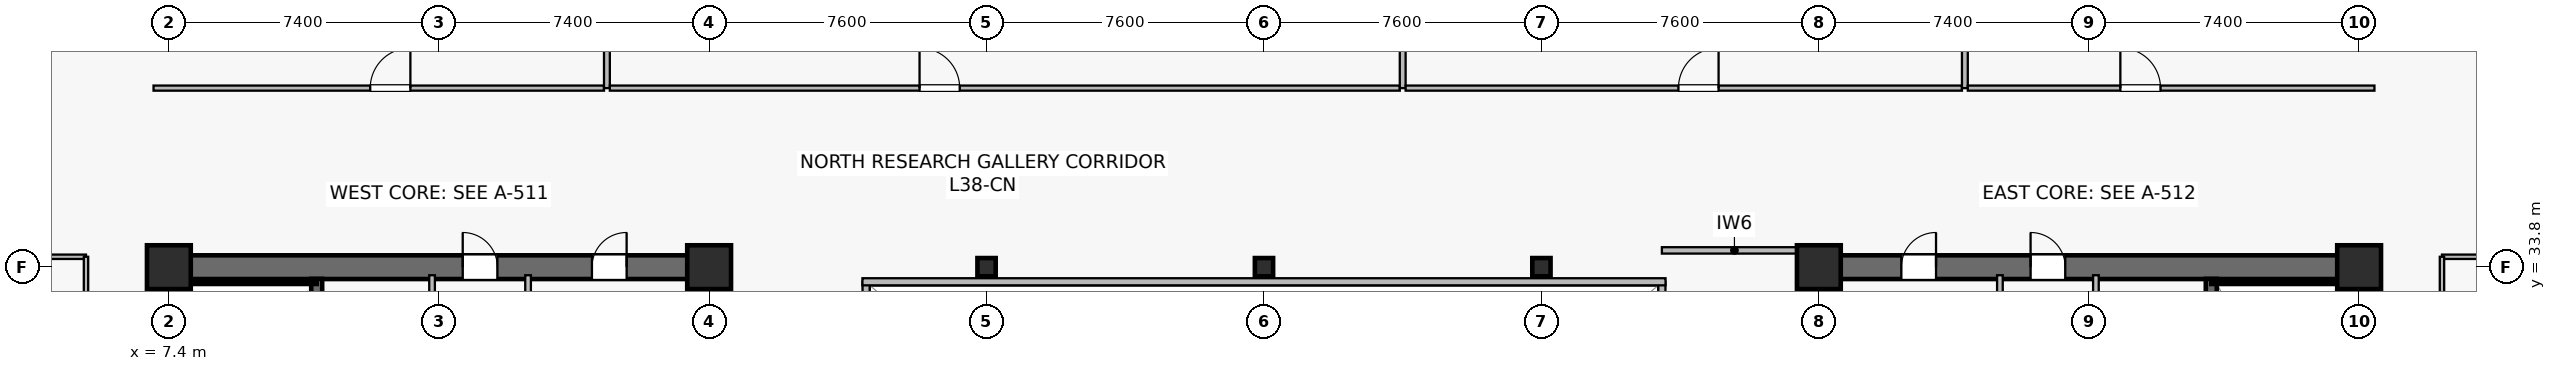
"""IFC4 building model, lengths in metres.
Left out: names, types, materials, properties, quantities, classifications, styles, units other than length and angle.
Written with IfcOpenShell. Run it as: python <this file> out.ifc"""

import sys

from ifc_helpers import new_model, si_unit, direction, frame, frame_2d, origin, origin_2d, place, context, subcontext, project, spatial, rectangle, hollow_rectangle, extrude, source, transform, mapped, element, fill, save


model = new_model("IFC4")
c1 = context("Model", 3, precision=1e-05, world=origin(), true_north=direction((0.0, 1.0)))
c2 = subcontext(c1, "Body", "Model", "MODEL_VIEW")
j1 = project(units=[si_unit("LENGTHUNIT", "METRE"), si_unit("PLANEANGLEUNIT", "RADIAN")], contexts=[c1])
p1 = place(None, origin())
s1 = spatial("IfcSite", under=j1, at=p1, CompositionType="ELEMENT")
p2 = place(p1, origin())
s2 = spatial("IfcBuilding", under=s1, at=p2, CompositionType="ELEMENT")
p3 = place(p2, frame((0.0, 0.0, 158.4)))
s3 = spatial("IfcBuildingStorey", under=s2, at=p3, CompositionType="ELEMENT", Elevation=158.4)
p4 = place(p3, frame((7.075, 33.8, 0.0), z_axis=(0.0, 0.0, 1.0), x_axis=(1.0, 0.0, 0.0)))
e1 = element("IfcWall", 1, at=p4, inside=s3, PredefinedType="SHEAR", context=c2, shape_type="SweptSolid", body=[
    extrude(rectangle(XDim=15.45, YDim=0.65, at=frame_2d((7.725, 0.0))), origin(), (0.0, 0.0, 1.0), 3.79),
])
p5 = place(p4, frame((8.375, 0.0, 0.0)))
e2 = element("IfcOpeningElement", 2, at=p5, cuts=e1, PredefinedType="OPENING", context=c2, shape_type="SweptSolid", body=[
    extrude(rectangle(XDim=0.95, YDim=2.15, at=frame_2d((0.475, 1.075))), frame((0.0, 0.335, 0.0), z_axis=(0.0, -1.0, 0.0), x_axis=(1.0, 0.0, 0.0)), (0.0, 0.0, 1.0), 0.67),
])
p6 = place(p4, frame((11.915, 0.0, 0.0)))
e3 = element("IfcOpeningElement", 3, at=p6, cuts=e1, PredefinedType="OPENING", context=c2, shape_type="SweptSolid", body=[
    extrude(rectangle(XDim=0.95, YDim=2.15, at=frame_2d((0.475, 1.075))), frame((0.0, 0.335, 0.0), z_axis=(0.0, -1.0, 0.0), x_axis=(1.0, 0.0, 0.0)), (0.0, 0.0, 1.0), 0.67),
])
p7 = place(p3, frame((7.4, 15.125, 0.0), z_axis=(0.0, 0.0, 1.0), x_axis=(0.0, 1.0, 0.0)))
e4 = element("IfcWall", 4, at=p7, inside=s3, PredefinedType="SHEAR", context=c2, shape_type="SweptSolid", body=[
    extrude(rectangle(XDim=18.35, YDim=0.65, at=frame_2d((9.175, 0.0))), origin(), (0.0, 0.0, 1.0), 3.79),
])
p8 = place(p3, frame((22.2, 15.125, 0.0), z_axis=(0.0, 0.0, 1.0), x_axis=(0.0, 1.0, 0.0)))
e5 = element("IfcWall", 5, at=p8, inside=s3, PredefinedType="SHEAR", context=c2, shape_type="SweptSolid", body=[
    extrude(rectangle(XDim=18.35, YDim=0.65, at=frame_2d((9.175, 0.0))), origin(), (0.0, 0.0, 1.0), 3.79),
])
p9 = place(p8, frame((3.425, 0.0, 0.0)))
e6 = element("IfcOpeningElement", 6, at=p9, cuts=e5, PredefinedType="OPENING", context=c2, shape_type="SweptSolid", body=[
    extrude(rectangle(XDim=1.42, YDim=2.2, at=frame_2d((0.71, 1.1))), frame((0.0, 0.335, 0.0), z_axis=(0.0, -1.0, 0.0), x_axis=(1.0, 0.0, 0.0)), (0.0, 0.0, 1.0), 0.67),
])
p10 = place(p3, frame((11.45, 24.85, 0.0), z_axis=(0.0, 0.0, 1.0), x_axis=(0.0, 1.0, 0.0)))
e7 = element("IfcWall", 7, at=p10, inside=s3, PredefinedType="SHEAR", context=c2, shape_type="SweptSolid", body=[
    extrude(rectangle(XDim=8.63, YDim=0.3, at=frame_2d((4.315, 0.0))), origin(), (0.0, 0.0, 1.0), 3.79),
])
p11 = place(p10, frame((0.42, 0.0, 0.0)))
e8 = element("IfcOpeningElement", 8, at=p11, cuts=e7, PredefinedType="OPENING", context=c2, shape_type="SweptSolid", body=[
    extrude(rectangle(XDim=1.1, YDim=2.15, at=frame_2d((0.55, 1.075))), frame((0.0, 0.16, 0.0), z_axis=(0.0, -1.0, 0.0), x_axis=(1.0, 0.0, 0.0)), (0.0, 0.0, 1.0), 0.32),
])
p12 = place(p3, frame((7.73, 33.4, 0.0), z_axis=(0.0, 0.0, 1.0), x_axis=(1.0, 0.0, 0.0)))
e9 = element("IfcWall", 9, at=p12, inside=s3, PredefinedType="SOLIDWALL", context=c2, shape_type="SweptSolid", body=[
    extrude(rectangle(XDim=3.72, YDim=0.12, at=frame_2d((1.86, 0.0))), origin(), (0.0, 0.0, 1.0), 3.79),
])
p13 = place(p3, frame((7.73, 25.0, 0.0), z_axis=(0.0, 0.0, 1.0), x_axis=(0.0, 1.0, 0.0)))
e10 = element("IfcWall", 10, at=p13, inside=s3, PredefinedType="SOLIDWALL", context=c2, shape_type="SweptSolid", body=[
    extrude(rectangle(XDim=8.32, YDim=0.12, at=frame_2d((4.16, 0.0))), origin(), (0.0, 0.0, 1.0), 3.79),
])
p14 = place(p3, frame((52.275, 33.8, 0.0), z_axis=(0.0, 0.0, 1.0), x_axis=(1.0, 0.0, 0.0)))
e11 = element("IfcWall", 11, at=p14, inside=s3, PredefinedType="SHEAR", context=c2, shape_type="SweptSolid", body=[
    extrude(rectangle(XDim=15.45, YDim=0.65, at=frame_2d((7.725, 0.0))), origin(), (0.0, 0.0, 1.0), 3.79),
])
p15 = place(p14, frame((6.125, 0.0, 0.0)))
e12 = element("IfcOpeningElement", 12, at=p15, cuts=e11, PredefinedType="OPENING", context=c2, shape_type="SweptSolid", body=[
    extrude(rectangle(XDim=0.95, YDim=2.15, at=frame_2d((0.475, 1.075))), frame((0.0, 0.335, 0.0), z_axis=(0.0, -1.0, 0.0), x_axis=(1.0, 0.0, 0.0)), (0.0, 0.0, 1.0), 0.67),
])
p16 = place(p14, frame((2.585, 0.0, 0.0)))
e13 = element("IfcOpeningElement", 13, at=p16, cuts=e11, PredefinedType="OPENING", context=c2, shape_type="SweptSolid", body=[
    extrude(rectangle(XDim=0.95, YDim=2.15, at=frame_2d((0.475, 1.075))), frame((0.0, 0.335, 0.0), z_axis=(0.0, -1.0, 0.0), x_axis=(1.0, 0.0, 0.0)), (0.0, 0.0, 1.0), 0.67),
])
p17 = place(p3, frame((52.6, 15.125, 0.0), z_axis=(0.0, 0.0, 1.0), x_axis=(0.0, 1.0, 0.0)))
e14 = element("IfcWall", 14, at=p17, inside=s3, PredefinedType="SHEAR", context=c2, shape_type="SweptSolid", body=[
    extrude(rectangle(XDim=18.35, YDim=0.65, at=frame_2d((9.175, 0.0))), origin(), (0.0, 0.0, 1.0), 3.79),
])
p18 = place(p17, frame((3.425, 0.0, 0.0)))
e15 = element("IfcOpeningElement", 15, at=p18, cuts=e14, PredefinedType="OPENING", context=c2, shape_type="SweptSolid", body=[
    extrude(rectangle(XDim=1.42, YDim=2.2, at=frame_2d((0.71, 1.1))), frame((0.0, 0.335, 0.0), z_axis=(0.0, -1.0, 0.0), x_axis=(1.0, 0.0, 0.0)), (0.0, 0.0, 1.0), 0.67),
])
p19 = place(p3, frame((67.4, 15.125, 0.0), z_axis=(0.0, 0.0, 1.0), x_axis=(0.0, 1.0, 0.0)))
e16 = element("IfcWall", 16, at=p19, inside=s3, PredefinedType="SHEAR", context=c2, shape_type="SweptSolid", body=[
    extrude(rectangle(XDim=18.35, YDim=0.65, at=frame_2d((9.175, 0.0))), origin(), (0.0, 0.0, 1.0), 3.79),
])
p20 = place(p3, frame((63.35, 24.85, 0.0), z_axis=(0.0, 0.0, 1.0), x_axis=(0.0, 1.0, 0.0)))
e17 = element("IfcWall", 17, at=p20, inside=s3, PredefinedType="SHEAR", context=c2, shape_type="SweptSolid", body=[
    extrude(rectangle(XDim=8.63, YDim=0.3, at=frame_2d((4.315, 0.0))), origin(), (0.0, 0.0, 1.0), 3.79),
])
p21 = place(p20, frame((0.42, 0.0, 0.0)))
e18 = element("IfcOpeningElement", 18, at=p21, cuts=e17, PredefinedType="OPENING", context=c2, shape_type="SweptSolid", body=[
    extrude(rectangle(XDim=1.1, YDim=2.15, at=frame_2d((0.55, 1.075))), frame((0.0, 0.16, 0.0), z_axis=(0.0, -1.0, 0.0), x_axis=(1.0, 0.0, 0.0)), (0.0, 0.0, 1.0), 0.32),
])
p22 = place(p3, frame((63.35, 33.4, 0.0), z_axis=(0.0, 0.0, 1.0), x_axis=(1.0, 0.0, 0.0)))
e19 = element("IfcWall", 19, at=p22, inside=s3, PredefinedType="SOLIDWALL", context=c2, shape_type="SweptSolid", body=[
    extrude(rectangle(XDim=3.72, YDim=0.12, at=frame_2d((1.86, 0.0))), origin(), (0.0, 0.0, 1.0), 3.79),
])
p23 = place(p3, frame((67.07, 25.0, 0.0), z_axis=(0.0, 0.0, 1.0), x_axis=(0.0, 1.0, 0.0)))
e20 = element("IfcWall", 20, at=p23, inside=s3, PredefinedType="SOLIDWALL", context=c2, shape_type="SweptSolid", body=[
    extrude(rectangle(XDim=8.32, YDim=0.12, at=frame_2d((4.16, 0.0))), origin(), (0.0, 0.0, 1.0), 3.79),
])
m1 = source(origin(), c2, "Body", "SweptSolid", [
    extrude(rectangle(XDim=1.2, YDim=1.2, at=origin_2d()), origin(), (0.0, 0.0, 1.0), 4.1),
])
for number, where, z_axis, x_axis in (
    (21, (7.4, 33.8, 0.0), (0.0, 0.0, 1.0), (1.0, 0.0, 0.0)),
    (22, (22.2, 33.8, 0.0), (0.0, 0.0, 1.0), (1.0, 0.0, 0.0)),
    (23, (52.6, 33.8, 0.0), (0.0, 0.0, 1.0), (1.0, 0.0, 0.0)),
    (24, (67.4, 33.8, 0.0), (0.0, 0.0, 1.0), (1.0, 0.0, 0.0)),
):
    element("IfcColumn", number, at=place(p3, frame(where, z_axis=z_axis, x_axis=x_axis)), inside=s3, PredefinedType="COLUMN", context=c2, shape_type="MappedRepresentation", body=[
        mapped(m1, transform((0.0, 0.0, 0.0), scale=1.0)),
    ])
m2 = source(origin(), c2, "Body", "SweptSolid", [
    extrude(hollow_rectangle(XDim=0.5, YDim=0.5, WallThickness=0.022, at=origin_2d()), origin(), (0.0, 0.0, 1.0), 4.1),
])
for number, where, z_axis, x_axis in (
    (25, (29.8, 33.8, 0.0), (0.0, 0.0, 1.0), (1.0, 0.0, 0.0)),
    (26, (37.4, 33.8, 0.0), (0.0, 0.0, 1.0), (1.0, 0.0, 0.0)),
    (27, (45.0, 33.8, 0.0), (0.0, 0.0, 1.0), (1.0, 0.0, 0.0)),
):
    element("IfcColumn", number, at=place(p3, frame(where, z_axis=z_axis, x_axis=x_axis)), inside=s3, PredefinedType="COLUMN", context=c2, shape_type="MappedRepresentation", body=[
        mapped(m2, transform((0.0, 0.0, 0.0), scale=1.0)),
    ])
p24 = place(p3, frame((14.61, 29.65, 0.0), z_axis=(0.0, 0.0, 1.0), x_axis=(0.0, 1.0, 0.0)))
e28 = element("IfcWall", 28, at=p24, inside=s3, PredefinedType="PLUMBINGWALL", context=c2, shape_type="SweptSolid", body=[
    extrude(rectangle(XDim=3.93, YDim=0.155, at=frame_2d((1.965, 0.0))), origin(), (0.0, 0.0, 1.0), 3.187),
])
p25 = place(p3, frame((17.24, 29.65, 0.0), z_axis=(0.0, 0.0, 1.0), x_axis=(0.0, 1.0, 0.0)))
e29 = element("IfcWall", 29, at=p25, inside=s3, PredefinedType="PLUMBINGWALL", context=c2, shape_type="SweptSolid", body=[
    extrude(rectangle(XDim=3.93, YDim=0.155, at=frame_2d((1.965, 0.0))), origin(), (0.0, 0.0, 1.0), 3.79),
])
p26 = place(p3, frame((60.19, 29.65, 0.0), z_axis=(0.0, 0.0, 1.0), x_axis=(0.0, 1.0, 0.0)))
e30 = element("IfcWall", 30, at=p26, inside=s3, PredefinedType="PLUMBINGWALL", context=c2, shape_type="SweptSolid", body=[
    extrude(rectangle(XDim=3.93, YDim=0.155, at=frame_2d((1.965, 0.0))), origin(), (0.0, 0.0, 1.0), 3.187),
])
p27 = place(p3, frame((57.56, 29.65, 0.0), z_axis=(0.0, 0.0, 1.0), x_axis=(0.0, 1.0, 0.0)))
e31 = element("IfcWall", 31, at=p27, inside=s3, PredefinedType="PLUMBINGWALL", context=c2, shape_type="SweptSolid", body=[
    extrude(rectangle(XDim=3.93, YDim=0.155, at=frame_2d((1.965, 0.0))), origin(), (0.0, 0.0, 1.0), 3.79),
])
p28 = place(p3, frame((48.3, 34.26, 0.0), z_axis=(0.0, 0.0, 1.0), x_axis=(1.0, 0.0, 0.0)))
e32 = element("IfcWall", 32, at=p28, inside=s3, PredefinedType="PARTITIONING", context=c2, shape_type="SweptSolid", body=[
    extrude(rectangle(XDim=3.975, YDim=0.175, at=frame_2d((1.987, 0.0))), origin(), (0.0, 0.0, 1.0), 3.475),
])
p29 = place(p3, frame((26.5, 15.2, 0.0), z_axis=(0.0, 0.0, 1.0), x_axis=(0.0, 1.0, 0.0)))
e33 = element("IfcWall", 33, at=p29, inside=s3, PredefinedType="SOLIDWALL", context=c2, shape_type="SweptSolid", body=[
    extrude(rectangle(XDim=18.2, YDim=0.195, at=frame_2d((9.1, 0.0))), origin(), (0.0, 0.0, 1.0), 3.79),
])
p30 = place(p29, frame((1.8, 0.0, 0.9)))
e34 = element("IfcOpeningElement", 34, at=p30, cuts=e33, PredefinedType="OPENING", context=c2, shape_type="SweptSolid", body=[
    extrude(rectangle(XDim=1.5, YDim=1.4, at=frame_2d((0.75, 0.7))), frame((0.0, 0.107, 0.0), z_axis=(0.0, -1.0, 0.0), x_axis=(1.0, 0.0, 0.0)), (0.0, 0.0, 1.0), 0.215),
])
p31 = place(p29, frame((13.2, 0.0, 0.9)))
e35 = element("IfcOpeningElement", 35, at=p31, cuts=e33, PredefinedType="OPENING", context=c2, shape_type="SweptSolid", body=[
    extrude(rectangle(XDim=1.5, YDim=1.4, at=frame_2d((0.75, 0.7))), frame((0.0, 0.107, 0.0), z_axis=(0.0, -1.0, 0.0), x_axis=(1.0, 0.0, 0.0)), (0.0, 0.0, 1.0), 0.215),
])
p32 = place(p3, frame((48.3, 15.2, 0.0), z_axis=(0.0, 0.0, 1.0), x_axis=(0.0, 1.0, 0.0)))
e36 = element("IfcWall", 36, at=p32, inside=s3, PredefinedType="SOLIDWALL", context=c2, shape_type="SweptSolid", body=[
    extrude(rectangle(XDim=18.2, YDim=0.195, at=frame_2d((9.1, 0.0))), origin(), (0.0, 0.0, 1.0), 3.79),
])
p33 = place(p32, frame((1.8, 0.0, 0.9)))
e37 = element("IfcOpeningElement", 37, at=p33, cuts=e36, PredefinedType="OPENING", context=c2, shape_type="SweptSolid", body=[
    extrude(rectangle(XDim=1.5, YDim=1.4, at=frame_2d((0.75, 0.7))), frame((0.0, 0.107, 0.0), z_axis=(0.0, -1.0, 0.0), x_axis=(1.0, 0.0, 0.0)), (0.0, 0.0, 1.0), 0.215),
])
p34 = place(p32, frame((13.2, 0.0, 0.9)))
e38 = element("IfcOpeningElement", 38, at=p34, cuts=e36, PredefinedType="OPENING", context=c2, shape_type="SweptSolid", body=[
    extrude(rectangle(XDim=1.5, YDim=1.4, at=frame_2d((0.75, 0.7))), frame((0.0, 0.107, 0.0), z_axis=(0.0, -1.0, 0.0), x_axis=(1.0, 0.0, 0.0)), (0.0, 0.0, 1.0), 0.215),
])
p35 = place(p3, frame((26.4, 33.4, 0.0), z_axis=(0.0, 0.0, 1.0), x_axis=(1.0, 0.0, 0.0)))
e39 = element("IfcWall", 39, at=p35, inside=s3, PredefinedType="SOLIDWALL", context=c2, shape_type="SweptSolid", body=[
    extrude(rectangle(XDim=22.0, YDim=0.195, at=frame_2d((11.0, 0.0))), origin(), (0.0, 0.0, 1.0), 3.79),
])
p36 = place(p3, frame((6.98, 38.705, 0.0), z_axis=(0.0, 0.0, 1.0), x_axis=(1.0, 0.0, 0.0)))
e40 = element("IfcWall", 40, at=p36, inside=s3, PredefinedType="PARTITIONING", context=c2, shape_type="SweptSolid", body=[
    extrude(rectangle(XDim=12.34, YDim=0.14, at=frame_2d((6.17, 0.0))), origin(), (0.0, 0.0, 1.0), 3.187),
])
p37 = place(p36, frame((5.936, 0.0, 0.0)))
e41 = element("IfcOpeningElement", 41, at=p37, cuts=e40, PredefinedType="OPENING", context=c2, shape_type="SweptSolid", body=[
    extrude(rectangle(XDim=1.1, YDim=2.18, at=frame_2d((0.55, 1.09))), frame((0.0, 0.08, 0.0), z_axis=(0.0, -1.0, 0.0), x_axis=(1.0, 0.0, 0.0)), (0.0, 0.0, 1.0), 0.16),
])
p38 = place(p3, frame((19.4, 38.705, 0.0), z_axis=(0.0, 0.0, 1.0), x_axis=(0.0, 1.0, 0.0)))
e42 = element("IfcWall", 42, at=p38, inside=s3, PredefinedType="PARTITIONING", context=c2, shape_type="SweptSolid", body=[
    extrude(rectangle(XDim=8.485, YDim=0.16, at=frame_2d((4.242, 0.0))), origin(), (0.0, 0.0, 1.0), 3.075),
])
p39 = place(p3, frame((19.48, 38.705, 0.0), z_axis=(0.0, 0.0, 1.0), x_axis=(1.0, 0.0, 0.0)))
e43 = element("IfcWall", 43, at=p39, inside=s3, PredefinedType="PARTITIONING", context=c2, shape_type="SweptSolid", body=[
    extrude(rectangle(XDim=21.64, YDim=0.14, at=frame_2d((10.82, 0.0))), origin(), (0.0, 0.0, 1.0), 3.187),
])
p40 = place(p39, frame((8.484, 0.0, 0.0)))
e44 = element("IfcOpeningElement", 44, at=p40, cuts=e43, PredefinedType="OPENING", context=c2, shape_type="SweptSolid", body=[
    extrude(rectangle(XDim=1.1, YDim=2.18, at=frame_2d((0.55, 1.09))), frame((0.0, 0.08, 0.0), z_axis=(0.0, -1.0, 0.0), x_axis=(1.0, 0.0, 0.0)), (0.0, 0.0, 1.0), 0.16),
])
p41 = place(p3, frame((41.2, 38.705, 0.0), z_axis=(0.0, 0.0, 1.0), x_axis=(0.0, 1.0, 0.0)))
e45 = element("IfcWall", 45, at=p41, inside=s3, PredefinedType="PARTITIONING", context=c2, shape_type="SweptSolid", body=[
    extrude(rectangle(XDim=7.285, YDim=0.16, at=frame_2d((3.643, 0.0))), origin(), (0.0, 0.0, 1.0), 3.075),
])
p42 = place(p3, frame((41.28, 38.705, 0.0), z_axis=(0.0, 0.0, 1.0), x_axis=(1.0, 0.0, 0.0)))
e46 = element("IfcWall", 46, at=p42, inside=s3, PredefinedType="PARTITIONING", context=c2, shape_type="SweptSolid", body=[
    extrude(rectangle(XDim=15.24, YDim=0.14, at=frame_2d((7.62, 0.0))), origin(), (0.0, 0.0, 1.0), 3.187),
])
p43 = place(p42, frame((7.473, 0.0, 0.0)))
e47 = element("IfcOpeningElement", 47, at=p43, cuts=e46, PredefinedType="OPENING", context=c2, shape_type="SweptSolid", body=[
    extrude(rectangle(XDim=1.1, YDim=2.18, at=frame_2d((0.55, 1.09))), frame((0.0, 0.08, 0.0), z_axis=(0.0, -1.0, 0.0), x_axis=(1.0, 0.0, 0.0)), (0.0, 0.0, 1.0), 0.16),
])
p44 = place(p3, frame((56.6, 38.705, 0.0), z_axis=(0.0, 0.0, 1.0), x_axis=(0.0, 1.0, 0.0)))
e48 = element("IfcWall", 48, at=p44, inside=s3, PredefinedType="PARTITIONING", context=c2, shape_type="SweptSolid", body=[
    extrude(rectangle(XDim=8.485, YDim=0.16, at=frame_2d((4.242, 0.0))), origin(), (0.0, 0.0, 1.0), 3.075),
])
p45 = place(p3, frame((56.68, 38.705, 0.0), z_axis=(0.0, 0.0, 1.0), x_axis=(1.0, 0.0, 0.0)))
e49 = element("IfcWall", 49, at=p45, inside=s3, PredefinedType="PARTITIONING", context=c2, shape_type="SweptSolid", body=[
    extrude(rectangle(XDim=11.14, YDim=0.14, at=frame_2d((5.57, 0.0))), origin(), (0.0, 0.0, 1.0), 3.187),
])
p46 = place(p45, frame((4.179, 0.0, 0.0)))
e50 = element("IfcOpeningElement", 50, at=p46, cuts=e49, PredefinedType="OPENING", context=c2, shape_type="SweptSolid", body=[
    extrude(rectangle(XDim=1.1, YDim=2.18, at=frame_2d((0.55, 1.09))), frame((0.0, 0.08, 0.0), z_axis=(0.0, -1.0, 0.0), x_axis=(1.0, 0.0, 0.0)), (0.0, 0.0, 1.0), 0.16),
])
p47 = place(p3, frame((2.11, 34.085, 0.0), z_axis=(0.0, 0.0, 1.0), x_axis=(1.0, 0.0, 0.0)))
e51 = element("IfcWall", 51, at=p47, inside=s3, PredefinedType="PARTITIONING", context=c2, shape_type="SweptSolid", body=[
    extrude(rectangle(XDim=3.02, YDim=0.12, at=frame_2d((1.51, 0.0))), origin(), (0.0, 0.0, 1.0), 3.79),
])
p48 = place(p3, frame((5.13, 27.86, 0.0), z_axis=(0.0, 0.0, 1.0), x_axis=(0.0, 1.0, 0.0)))
e52 = element("IfcWall", 52, at=p48, inside=s3, PredefinedType="PARTITIONING", context=c2, shape_type="SweptSolid", body=[
    extrude(rectangle(XDim=6.225, YDim=0.12, at=frame_2d((3.112, 0.0))), origin(), (0.0, 0.0, 1.0), 3.79),
])
p49 = place(p48, frame((2.663, 0.0, 0.0)))
e53 = element("IfcOpeningElement", 53, at=p49, cuts=e52, PredefinedType="OPENING", context=c2, shape_type="SweptSolid", body=[
    extrude(rectangle(XDim=0.9, YDim=2.1, at=frame_2d((0.45, 1.05))), frame((0.0, 0.07, 0.0), z_axis=(0.0, -1.0, 0.0), x_axis=(1.0, 0.0, 0.0)), (0.0, 0.0, 1.0), 0.14),
])
p50 = place(p3, frame((69.67, 34.085, 0.0), z_axis=(0.0, 0.0, 1.0), x_axis=(1.0, 0.0, 0.0)))
e54 = element("IfcWall", 54, at=p50, inside=s3, PredefinedType="PARTITIONING", context=c2, shape_type="SweptSolid", body=[
    extrude(rectangle(XDim=3.02, YDim=0.12, at=frame_2d((1.51, 0.0))), origin(), (0.0, 0.0, 1.0), 3.79),
])
p51 = place(p3, frame((69.67, 24.46, 0.0), z_axis=(0.0, 0.0, 1.0), x_axis=(0.0, 1.0, 0.0)))
e55 = element("IfcWall", 55, at=p51, inside=s3, PredefinedType="PARTITIONING", context=c2, shape_type="SweptSolid", body=[
    extrude(rectangle(XDim=9.625, YDim=0.12, at=frame_2d((4.812, 0.0))), origin(), (0.0, 0.0, 1.0), 3.79),
])
p52 = place(p51, frame((4.363, 0.0, 0.0)))
e56 = element("IfcOpeningElement", 56, at=p52, cuts=e55, PredefinedType="OPENING", context=c2, shape_type="SweptSolid", body=[
    extrude(rectangle(XDim=0.9, YDim=2.1, at=frame_2d((0.45, 1.05))), frame((0.0, 0.07, 0.0), z_axis=(0.0, -1.0, 0.0), x_axis=(1.0, 0.0, 0.0)), (0.0, 0.0, 1.0), 0.14),
])
m3 = source(origin(), c2, "Body", "SweptSolid", [
    extrude(rectangle(XDim=0.95, YDim=2.15, at=frame_2d((0.475, 1.075))), frame((0.0, 0.025, 0.0), z_axis=(0.0, -1.0, 0.0), x_axis=(1.0, 0.0, 0.0)), (0.0, 0.0, 1.0), 0.05),
])
p53 = place(p5, origin())
e57 = element("IfcDoor", 57, at=p53, inside=s3, OperationType="SINGLE_SWING_LEFT", PredefinedType="DOOR", context=c2, shape_type="MappedRepresentation", body=[
    mapped(m3, transform((0.0, 0.0, 0.0), scale=1.0)),
])
fill(e2, e57)
p54 = place(p6, origin())
e58 = element("IfcDoor", 58, at=p54, inside=s3, OperationType="SINGLE_SWING_RIGHT", PredefinedType="DOOR", context=c2, shape_type="MappedRepresentation", body=[
    mapped(m3, transform((0.0, 0.0, 0.0), scale=1.0)),
])
fill(e3, e58)
p55 = place(p15, origin())
e59 = element("IfcDoor", 59, at=p55, inside=s3, OperationType="SINGLE_SWING_LEFT", PredefinedType="DOOR", context=c2, shape_type="MappedRepresentation", body=[
    mapped(m3, transform((0.0, 0.0, 0.0), scale=1.0)),
])
fill(e12, e59)
p56 = place(p16, origin())
e60 = element("IfcDoor", 60, at=p56, inside=s3, OperationType="SINGLE_SWING_RIGHT", PredefinedType="DOOR", context=c2, shape_type="MappedRepresentation", body=[
    mapped(m3, transform((0.0, 0.0, 0.0), scale=1.0)),
])
fill(e13, e60)
m4 = source(origin(), c2, "Body", "SweptSolid", [
    extrude(rectangle(XDim=1.1, YDim=2.18, at=frame_2d((0.55, 1.09))), frame((0.0, 0.025, 0.0), z_axis=(0.0, -1.0, 0.0), x_axis=(1.0, 0.0, 0.0)), (0.0, 0.0, 1.0), 0.05),
])
p57 = place(p37, origin())
e61 = element("IfcDoor", 61, at=p57, inside=s3, OperationType="SINGLE_SWING_RIGHT", PredefinedType="DOOR", context=c2, shape_type="MappedRepresentation", body=[
    mapped(m4, transform((0.0, 0.0, 0.0), scale=1.0)),
])
fill(e41, e61)
p58 = place(p40, origin())
e62 = element("IfcDoor", 62, at=p58, inside=s3, OperationType="SINGLE_SWING_LEFT", PredefinedType="DOOR", context=c2, shape_type="MappedRepresentation", body=[
    mapped(m4, transform((0.0, 0.0, 0.0), scale=1.0)),
])
fill(e44, e62)
p59 = place(p43, origin())
e63 = element("IfcDoor", 63, at=p59, inside=s3, OperationType="SINGLE_SWING_RIGHT", PredefinedType="DOOR", context=c2, shape_type="MappedRepresentation", body=[
    mapped(m4, transform((0.0, 0.0, 0.0), scale=1.0)),
])
fill(e47, e63)
p60 = place(p46, origin())
e64 = element("IfcDoor", 64, at=p60, inside=s3, OperationType="SINGLE_SWING_LEFT", PredefinedType="DOOR", context=c2, shape_type="MappedRepresentation", body=[
    mapped(m4, transform((0.0, 0.0, 0.0), scale=1.0)),
])
fill(e50, e64)
save(model, sys.argv[1])
